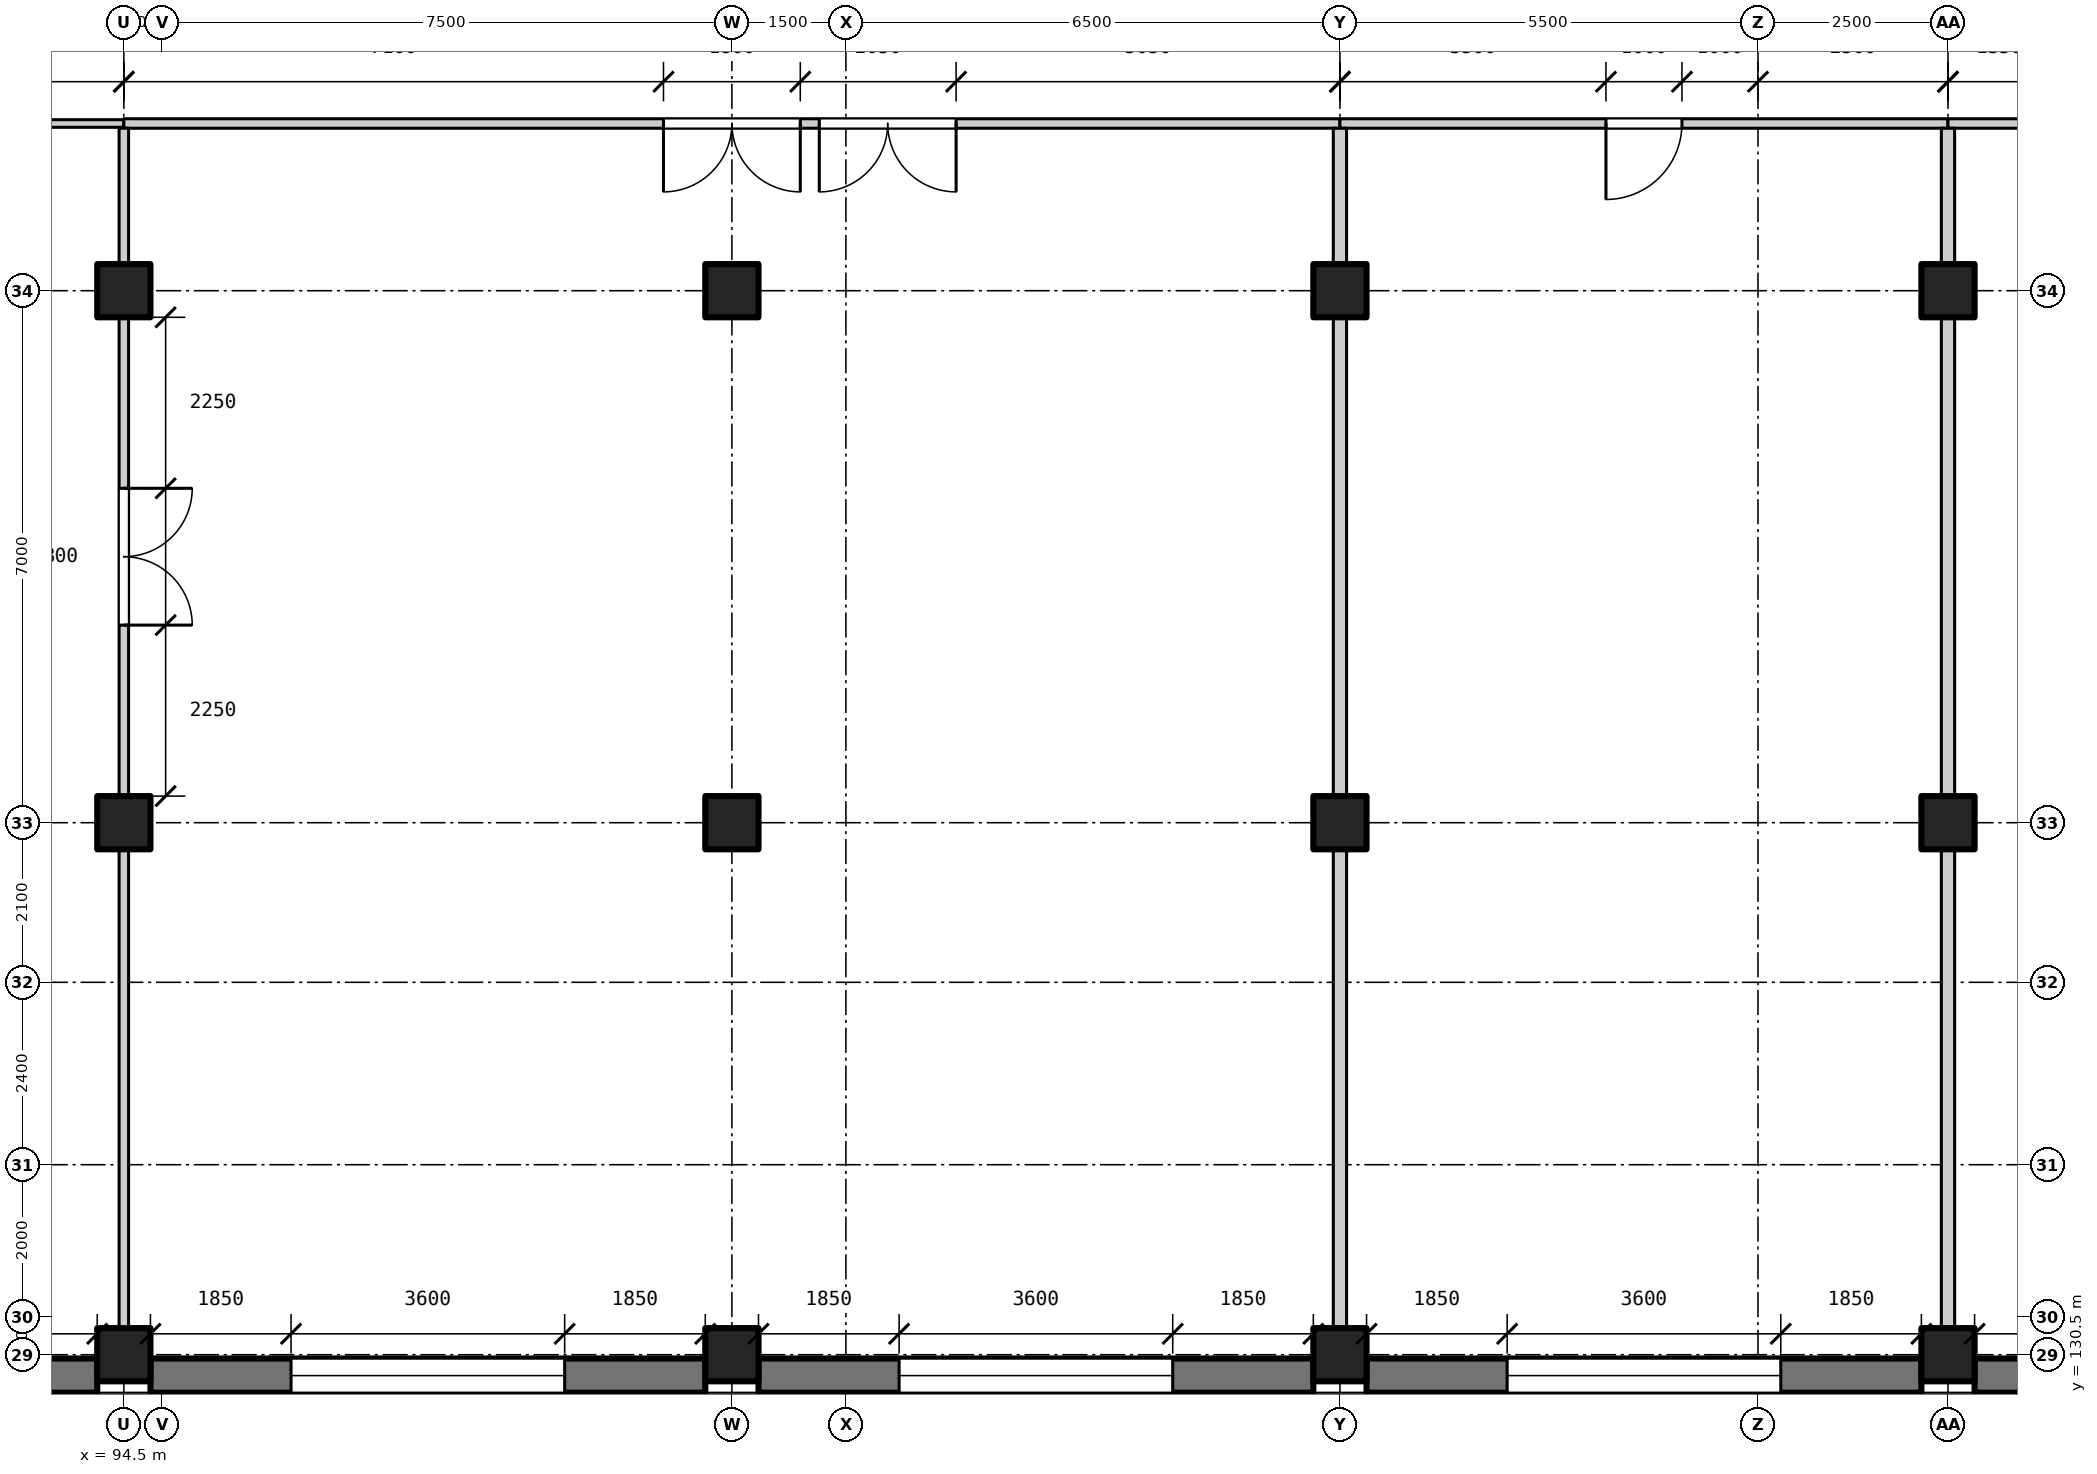
"""IFC4 building model, lengths in metres.
Left out: names, types, materials, properties, quantities, classifications, styles, units other than length and angle.
Written with IfcOpenShell. Run it as: python <this file> out.ifc"""

import sys

from ifc_helpers import new_model, si_unit, direction, frame, frame_2d, origin, origin_2d, place, context, subcontext, project, spatial, rectangle, extrude, element, fill, save


model = new_model("IFC4")
c1 = context("Model", 3, precision=1e-05, world=origin(), true_north=direction((0.0, 1.0)))
c2 = subcontext(c1, "Body", "Model", "MODEL_VIEW")
j1 = project(units=[si_unit("LENGTHUNIT", "METRE"), si_unit("PLANEANGLEUNIT", "RADIAN")], contexts=[c1])
p1 = place(None, origin())
s1 = spatial("IfcSite", under=j1, at=p1, CompositionType="ELEMENT")
p2 = place(p1, origin())
s2 = spatial("IfcBuilding", under=s1, at=p2, CompositionType="ELEMENT")
p3 = place(p2, origin())
s3 = spatial("IfcBuildingStorey", under=s2, at=p3, CompositionType="ELEMENT", Elevation=0.0)
for number, where, z_axis, x_axis in (
    (1, (94.5, 130.5, -1.4), (0.0, 0.0, 1.0), (1.0, 0.0, 0.0)),
    (2, (94.5, 137.5, -1.4), (0.0, 0.0, 1.0), (1.0, 0.0, 0.0)),
    (3, (94.5, 144.5, -1.4), (0.0, 0.0, 1.0), (1.0, 0.0, 0.0)),
    (4, (102.5, 130.5, -1.4), (0.0, 0.0, 1.0), (1.0, 0.0, 0.0)),
    (5, (102.5, 137.5, -1.4), (0.0, 0.0, 1.0), (1.0, 0.0, 0.0)),
    (6, (102.5, 144.5, -1.4), (0.0, 0.0, 1.0), (1.0, 0.0, 0.0)),
    (7, (110.5, 130.5, -1.4), (0.0, 0.0, 1.0), (1.0, 0.0, 0.0)),
    (8, (110.5, 137.5, -1.4), (0.0, 0.0, 1.0), (1.0, 0.0, 0.0)),
    (9, (110.5, 144.5, -1.4), (0.0, 0.0, 1.0), (1.0, 0.0, 0.0)),
    (10, (118.5, 130.5, -1.4), (0.0, 0.0, 1.0), (1.0, 0.0, 0.0)),
    (11, (118.5, 137.5, -1.4), (0.0, 0.0, 1.0), (1.0, 0.0, 0.0)),
    (12, (118.5, 144.5, -1.4), (0.0, 0.0, 1.0), (1.0, 0.0, 0.0)),
):
    element("IfcColumn", number, at=place(p3, frame(where, z_axis=z_axis, x_axis=x_axis)), inside=s3, PredefinedType="COLUMN", context=c2, shape_type="SweptSolid", body=[
        extrude(rectangle(XDim=0.7, YDim=0.7, at=origin_2d()), origin(), (0.0, 0.0, 1.0), 7.4),
    ])
p4 = place(p3, frame((94.15, 130.225, 0.0), z_axis=(0.0, 0.0, 1.0), x_axis=(-1.0, 0.0, 0.0)))
e13 = element("IfcWall", 13, at=p4, inside=s3, PredefinedType="SOLIDWALL", context=c2, shape_type="SweptSolid", body=[
    extrude(rectangle(XDim=7.3, YDim=0.45, at=frame_2d((3.65, 0.0))), origin(), (0.0, 0.0, 1.0), 4.9),
])
p5 = place(p4, frame((1.85, 0.0, 0.9)))
e14 = element("IfcOpeningElement", 14, at=p5, cuts=e13, PredefinedType="OPENING", context=c2, shape_type="SweptSolid", body=[
    extrude(rectangle(XDim=3.6, YDim=1.6, at=frame_2d((1.8, 0.8))), frame((0.0, 0.235, 0.0), z_axis=(0.0, -1.0, 0.0), x_axis=(1.0, 0.0, 0.0)), (0.0, 0.0, 1.0), 0.47),
])
p6 = place(p3, frame((102.15, 130.225, 0.0), z_axis=(0.0, 0.0, 1.0), x_axis=(-1.0, 0.0, 0.0)))
e15 = element("IfcWall", 15, at=p6, inside=s3, PredefinedType="SOLIDWALL", context=c2, shape_type="SweptSolid", body=[
    extrude(rectangle(XDim=7.3, YDim=0.45, at=frame_2d((3.65, 0.0))), origin(), (0.0, 0.0, 1.0), 4.9),
])
p7 = place(p6, frame((1.85, 0.0, 0.9)))
e16 = element("IfcOpeningElement", 16, at=p7, cuts=e15, PredefinedType="OPENING", context=c2, shape_type="SweptSolid", body=[
    extrude(rectangle(XDim=3.6, YDim=1.6, at=frame_2d((1.8, 0.8))), frame((0.0, 0.235, 0.0), z_axis=(0.0, -1.0, 0.0), x_axis=(1.0, 0.0, 0.0)), (0.0, 0.0, 1.0), 0.47),
])
p8 = place(p3, frame((110.15, 130.225, 0.0), z_axis=(0.0, 0.0, 1.0), x_axis=(-1.0, 0.0, 0.0)))
e17 = element("IfcWall", 17, at=p8, inside=s3, PredefinedType="SOLIDWALL", context=c2, shape_type="SweptSolid", body=[
    extrude(rectangle(XDim=7.3, YDim=0.45, at=frame_2d((3.65, 0.0))), origin(), (0.0, 0.0, 1.0), 4.9),
])
p9 = place(p8, frame((1.85, 0.0, 0.9)))
e18 = element("IfcOpeningElement", 18, at=p9, cuts=e17, PredefinedType="OPENING", context=c2, shape_type="SweptSolid", body=[
    extrude(rectangle(XDim=3.6, YDim=1.6, at=frame_2d((1.8, 0.8))), frame((0.0, 0.235, 0.0), z_axis=(0.0, -1.0, 0.0), x_axis=(1.0, 0.0, 0.0)), (0.0, 0.0, 1.0), 0.47),
])
p10 = place(p3, frame((118.15, 130.225, 0.0), z_axis=(0.0, 0.0, 1.0), x_axis=(-1.0, 0.0, 0.0)))
e19 = element("IfcWall", 19, at=p10, inside=s3, PredefinedType="SOLIDWALL", context=c2, shape_type="SweptSolid", body=[
    extrude(rectangle(XDim=7.3, YDim=0.45, at=frame_2d((3.65, 0.0))), origin(), (0.0, 0.0, 1.0), 4.9),
])
p11 = place(p10, frame((1.85, 0.0, 0.9)))
e20 = element("IfcOpeningElement", 20, at=p11, cuts=e19, PredefinedType="OPENING", context=c2, shape_type="SweptSolid", body=[
    extrude(rectangle(XDim=3.6, YDim=1.6, at=frame_2d((1.8, 0.8))), frame((0.0, 0.235, 0.0), z_axis=(0.0, -1.0, 0.0), x_axis=(1.0, 0.0, 0.0)), (0.0, 0.0, 1.0), 0.47),
])
p12 = place(p3, frame((126.15, 130.225, 0.0), z_axis=(0.0, 0.0, 1.0), x_axis=(-1.0, 0.0, 0.0)))
e21 = element("IfcWall", 21, at=p12, inside=s3, PredefinedType="SOLIDWALL", context=c2, shape_type="SweptSolid", body=[
    extrude(rectangle(XDim=7.3, YDim=0.45, at=frame_2d((3.65, 0.0))), origin(), (0.0, 0.0, 1.0), 4.9),
])
p13 = place(p12, frame((1.85, 0.0, 0.9)))
e22 = element("IfcOpeningElement", 22, at=p13, cuts=e21, PredefinedType="OPENING", context=c2, shape_type="SweptSolid", body=[
    extrude(rectangle(XDim=3.6, YDim=1.6, at=frame_2d((1.8, 0.8))), frame((0.0, 0.235, 0.0), z_axis=(0.0, -1.0, 0.0), x_axis=(1.0, 0.0, 0.0)), (0.0, 0.0, 1.0), 0.47),
])
p14 = place(p3, frame((86.45, 146.7, 0.0), z_axis=(0.0, 0.0, 1.0), x_axis=(1.0, 0.0, 0.0)))
e23 = element("IfcWall", 23, at=p14, inside=s3, PredefinedType="PARTITIONING", context=c2, shape_type="SweptSolid", body=[
    extrude(rectangle(XDim=8.05, YDim=0.1, at=frame_2d((4.025, 0.0))), origin(), (0.0, 0.0, 1.0), 5.7),
])
p15 = place(p14, frame((3.15, 0.0, 0.0)))
e24 = element("IfcOpeningElement", 24, at=p15, cuts=e23, PredefinedType="OPENING", context=c2, shape_type="SweptSolid", body=[
    extrude(rectangle(XDim=1.8, YDim=2.1, at=frame_2d((0.9, 1.05))), frame((0.0, 0.06, 0.0), z_axis=(0.0, -1.0, 0.0), x_axis=(1.0, 0.0, 0.0)), (0.0, 0.0, 1.0), 0.12),
])
p16 = place(p3, frame((94.5, 146.7, 0.0), z_axis=(0.0, 0.0, 1.0), x_axis=(1.0, 0.0, 0.0)))
e25 = element("IfcWall", 25, at=p16, inside=s3, PredefinedType="PARTITIONING", context=c2, shape_type="SweptSolid", body=[
    extrude(rectangle(XDim=16.0, YDim=0.125, at=frame_2d((8.0, 0.0))), origin(), (0.0, 0.0, 1.0), 5.7),
])
p17 = place(p16, frame((7.1, 0.0, 0.0)))
e26 = element("IfcOpeningElement", 26, at=p17, cuts=e25, PredefinedType="OPENING", context=c2, shape_type="SweptSolid", body=[
    extrude(rectangle(XDim=1.8, YDim=2.1, at=frame_2d((0.9, 1.05))), frame((0.0, 0.073, 0.0), z_axis=(0.0, -1.0, 0.0), x_axis=(1.0, 0.0, 0.0)), (0.0, 0.0, 1.0), 0.145),
])
p18 = place(p16, frame((9.15, 0.0, 0.0)))
e27 = element("IfcOpeningElement", 27, at=p18, cuts=e25, PredefinedType="OPENING", context=c2, shape_type="SweptSolid", body=[
    extrude(rectangle(XDim=1.8, YDim=2.1, at=frame_2d((0.9, 1.05))), frame((0.0, 0.073, 0.0), z_axis=(0.0, -1.0, 0.0), x_axis=(1.0, 0.0, 0.0)), (0.0, 0.0, 1.0), 0.145),
])
p19 = place(p3, frame((110.5, 146.7, 0.0), z_axis=(0.0, 0.0, 1.0), x_axis=(1.0, 0.0, 0.0)))
e28 = element("IfcWall", 28, at=p19, inside=s3, PredefinedType="PARTITIONING", context=c2, shape_type="SweptSolid", body=[
    extrude(rectangle(XDim=8.0, YDim=0.125, at=frame_2d((4.0, 0.0))), origin(), (0.0, 0.0, 1.0), 5.7),
])
p20 = place(p19, frame((3.5, 0.0, 0.0)))
e29 = element("IfcOpeningElement", 29, at=p20, cuts=e28, PredefinedType="OPENING", context=c2, shape_type="SweptSolid", body=[
    extrude(rectangle(XDim=1.0, YDim=2.1, at=frame_2d((0.5, 1.05))), frame((0.0, 0.073, 0.0), z_axis=(0.0, -1.0, 0.0), x_axis=(1.0, 0.0, 0.0)), (0.0, 0.0, 1.0), 0.145),
])
p21 = place(p3, frame((118.5, 146.7, 0.0), z_axis=(0.0, 0.0, 1.0), x_axis=(1.0, 0.0, 0.0)))
e30 = element("IfcWall", 30, at=p21, inside=s3, PredefinedType="PARTITIONING", context=c2, shape_type="SweptSolid", body=[
    extrude(rectangle(XDim=15.05, YDim=0.125, at=frame_2d((7.525, 0.0))), origin(), (0.0, 0.0, 1.0), 5.7),
])
p22 = place(p21, frame((1.35, 0.0, 0.0)))
e31 = element("IfcOpeningElement", 31, at=p22, cuts=e30, PredefinedType="OPENING", context=c2, shape_type="SweptSolid", body=[
    extrude(rectangle(XDim=1.8, YDim=2.1, at=frame_2d((0.9, 1.05))), frame((0.0, 0.073, 0.0), z_axis=(0.0, -1.0, 0.0), x_axis=(1.0, 0.0, 0.0)), (0.0, 0.0, 1.0), 0.145),
])
p23 = place(p21, frame((11.9, 0.0, 0.0)))
e32 = element("IfcOpeningElement", 32, at=p23, cuts=e30, PredefinedType="OPENING", context=c2, shape_type="SweptSolid", body=[
    extrude(rectangle(XDim=1.8, YDim=2.1, at=frame_2d((0.9, 1.05))), frame((0.0, 0.073, 0.0), z_axis=(0.0, -1.0, 0.0), x_axis=(1.0, 0.0, 0.0)), (0.0, 0.0, 1.0), 0.145),
])
p24 = place(p3, frame((94.5, 130.85, 0.0), z_axis=(0.0, 0.0, 1.0), x_axis=(0.0, 1.0, 0.0)))
e33 = element("IfcWall", 33, at=p24, inside=s3, PredefinedType="PARTITIONING", context=c2, shape_type="SweptSolid", body=[
    extrude(rectangle(XDim=6.3, YDim=0.125, at=frame_2d((3.15, 0.0))), origin(), (0.0, 0.0, 1.0), 5.0),
])
p25 = place(p3, frame((94.5, 137.85, 0.0), z_axis=(0.0, 0.0, 1.0), x_axis=(0.0, 1.0, 0.0)))
e34 = element("IfcWall", 34, at=p25, inside=s3, PredefinedType="PARTITIONING", context=c2, shape_type="SweptSolid", body=[
    extrude(rectangle(XDim=6.3, YDim=0.125, at=frame_2d((3.15, 0.0))), origin(), (0.0, 0.0, 1.0), 5.0),
])
p26 = place(p25, frame((2.25, 0.0, 0.0)))
e35 = element("IfcOpeningElement", 35, at=p26, cuts=e34, PredefinedType="OPENING", context=c2, shape_type="SweptSolid", body=[
    extrude(rectangle(XDim=1.8, YDim=2.1, at=frame_2d((0.9, 1.05))), frame((0.0, 0.073, 0.0), z_axis=(0.0, -1.0, 0.0), x_axis=(1.0, 0.0, 0.0)), (0.0, 0.0, 1.0), 0.145),
])
p27 = place(p3, frame((94.5, 144.85, 0.0), z_axis=(0.0, 0.0, 1.0), x_axis=(0.0, 1.0, 0.0)))
e36 = element("IfcWall", 36, at=p27, inside=s3, PredefinedType="PARTITIONING", context=c2, shape_type="SweptSolid", body=[
    extrude(rectangle(XDim=1.787, YDim=0.125, at=frame_2d((0.894, 0.0))), origin(), (0.0, 0.0, 1.0), 5.0),
])
for number, where, z_axis, x_axis in (
    (37, (110.5, 130.85, 0.0), (0.0, 0.0, 1.0), (0.0, 1.0, 0.0)),
    (38, (110.5, 137.85, 0.0), (0.0, 0.0, 1.0), (0.0, 1.0, 0.0)),
):
    element("IfcWall", number, at=place(p3, frame(where, z_axis=z_axis, x_axis=x_axis)), inside=s3, PredefinedType="PARTITIONING", context=c2, shape_type="SweptSolid", body=[
        extrude(rectangle(XDim=6.3, YDim=0.175, at=frame_2d((3.15, 0.0))), origin(), (0.0, 0.0, 1.0), 5.0),
    ])
p28 = place(p3, frame((110.5, 144.85, 0.0), z_axis=(0.0, 0.0, 1.0), x_axis=(0.0, 1.0, 0.0)))
e39 = element("IfcWall", 39, at=p28, inside=s3, PredefinedType="PARTITIONING", context=c2, shape_type="SweptSolid", body=[
    extrude(rectangle(XDim=1.787, YDim=0.175, at=frame_2d((0.894, 0.0))), origin(), (0.0, 0.0, 1.0), 5.0),
])
for number, where, z_axis, x_axis in (
    (40, (118.5, 130.85, 0.0), (0.0, 0.0, 1.0), (0.0, 1.0, 0.0)),
    (41, (118.5, 137.85, 0.0), (0.0, 0.0, 1.0), (0.0, 1.0, 0.0)),
):
    element("IfcWall", number, at=place(p3, frame(where, z_axis=z_axis, x_axis=x_axis)), inside=s3, PredefinedType="PARTITIONING", context=c2, shape_type="SweptSolid", body=[
        extrude(rectangle(XDim=6.3, YDim=0.175, at=frame_2d((3.15, 0.0))), origin(), (0.0, 0.0, 1.0), 5.0),
    ])
p29 = place(p3, frame((118.5, 144.85, 0.0), z_axis=(0.0, 0.0, 1.0), x_axis=(0.0, 1.0, 0.0)))
e42 = element("IfcWall", 42, at=p29, inside=s3, PredefinedType="PARTITIONING", context=c2, shape_type="SweptSolid", body=[
    extrude(rectangle(XDim=1.787, YDim=0.175, at=frame_2d((0.894, 0.0))), origin(), (0.0, 0.0, 1.0), 5.0),
])
p30 = place(p7, origin())
e43 = element("IfcWindow", 43, at=p30, inside=s3, PartitioningType="SINGLE_PANEL", PredefinedType="WINDOW", context=c2, shape_type="SweptSolid", body=[
    extrude(rectangle(XDim=3.6, YDim=1.6, at=frame_2d((1.8, 0.8))), frame((0.0, -0.125, 0.0), z_axis=(0.0, -1.0, 0.0), x_axis=(1.0, 0.0, 0.0)), (0.0, 0.0, 1.0), 0.06),
])
fill(e16, e43)
p31 = place(p9, origin())
e44 = element("IfcWindow", 44, at=p31, inside=s3, PartitioningType="SINGLE_PANEL", PredefinedType="WINDOW", context=c2, shape_type="SweptSolid", body=[
    extrude(rectangle(XDim=3.6, YDim=1.6, at=frame_2d((1.8, 0.8))), frame((0.0, -0.125, 0.0), z_axis=(0.0, -1.0, 0.0), x_axis=(1.0, 0.0, 0.0)), (0.0, 0.0, 1.0), 0.06),
])
fill(e18, e44)
p32 = place(p11, origin())
e45 = element("IfcWindow", 45, at=p32, inside=s3, PartitioningType="SINGLE_PANEL", PredefinedType="WINDOW", context=c2, shape_type="SweptSolid", body=[
    extrude(rectangle(XDim=3.6, YDim=1.6, at=frame_2d((1.8, 0.8))), frame((0.0, -0.125, 0.0), z_axis=(0.0, -1.0, 0.0), x_axis=(1.0, 0.0, 0.0)), (0.0, 0.0, 1.0), 0.06),
])
fill(e20, e45)
p33 = place(p26, frame((1.8, 0.0, 0.0), z_axis=(0.0, 0.0, 1.0), x_axis=(-1.0, 0.0, 0.0)))
e46 = element("IfcDoor", 46, at=p33, inside=s3, OperationType="DOUBLE_DOOR_SINGLE_SWING", PredefinedType="DOOR", context=c2, shape_type="SweptSolid", body=[
    extrude(rectangle(XDim=1.8, YDim=2.1, at=frame_2d((0.9, 1.05))), frame((0.0, 0.025, 0.0), z_axis=(0.0, -1.0, 0.0), x_axis=(1.0, 0.0, 0.0)), (0.0, 0.0, 1.0), 0.05),
])
fill(e35, e46)
p34 = place(p17, frame((1.8, 0.0, 0.0), z_axis=(0.0, 0.0, 1.0), x_axis=(-1.0, 0.0, 0.0)))
e47 = element("IfcDoor", 47, at=p34, inside=s3, OperationType="DOUBLE_DOOR_SINGLE_SWING", PredefinedType="DOOR", context=c2, shape_type="SweptSolid", body=[
    extrude(rectangle(XDim=1.8, YDim=2.1, at=frame_2d((0.9, 1.05))), frame((0.0, 0.025, 0.0), z_axis=(0.0, -1.0, 0.0), x_axis=(1.0, 0.0, 0.0)), (0.0, 0.0, 1.0), 0.05),
])
fill(e26, e47)
p35 = place(p18, frame((1.8, 0.0, 0.0), z_axis=(0.0, 0.0, 1.0), x_axis=(-1.0, 0.0, 0.0)))
e48 = element("IfcDoor", 48, at=p35, inside=s3, OperationType="DOUBLE_DOOR_SINGLE_SWING", PredefinedType="DOOR", context=c2, shape_type="SweptSolid", body=[
    extrude(rectangle(XDim=1.8, YDim=2.1, at=frame_2d((0.9, 1.05))), frame((0.0, 0.025, 0.0), z_axis=(0.0, -1.0, 0.0), x_axis=(1.0, 0.0, 0.0)), (0.0, 0.0, 1.0), 0.05),
])
fill(e27, e48)
p36 = place(p20, frame((1.0, 0.0, 0.0), z_axis=(0.0, 0.0, 1.0), x_axis=(-1.0, 0.0, 0.0)))
e49 = element("IfcDoor", 49, at=p36, inside=s3, OperationType="SINGLE_SWING_RIGHT", PredefinedType="DOOR", context=c2, shape_type="SweptSolid", body=[
    extrude(rectangle(XDim=1.0, YDim=2.1, at=frame_2d((0.5, 1.05))), frame((0.0, 0.025, 0.0), z_axis=(0.0, -1.0, 0.0), x_axis=(1.0, 0.0, 0.0)), (0.0, 0.0, 1.0), 0.05),
])
fill(e29, e49)
save(model, sys.argv[1])
